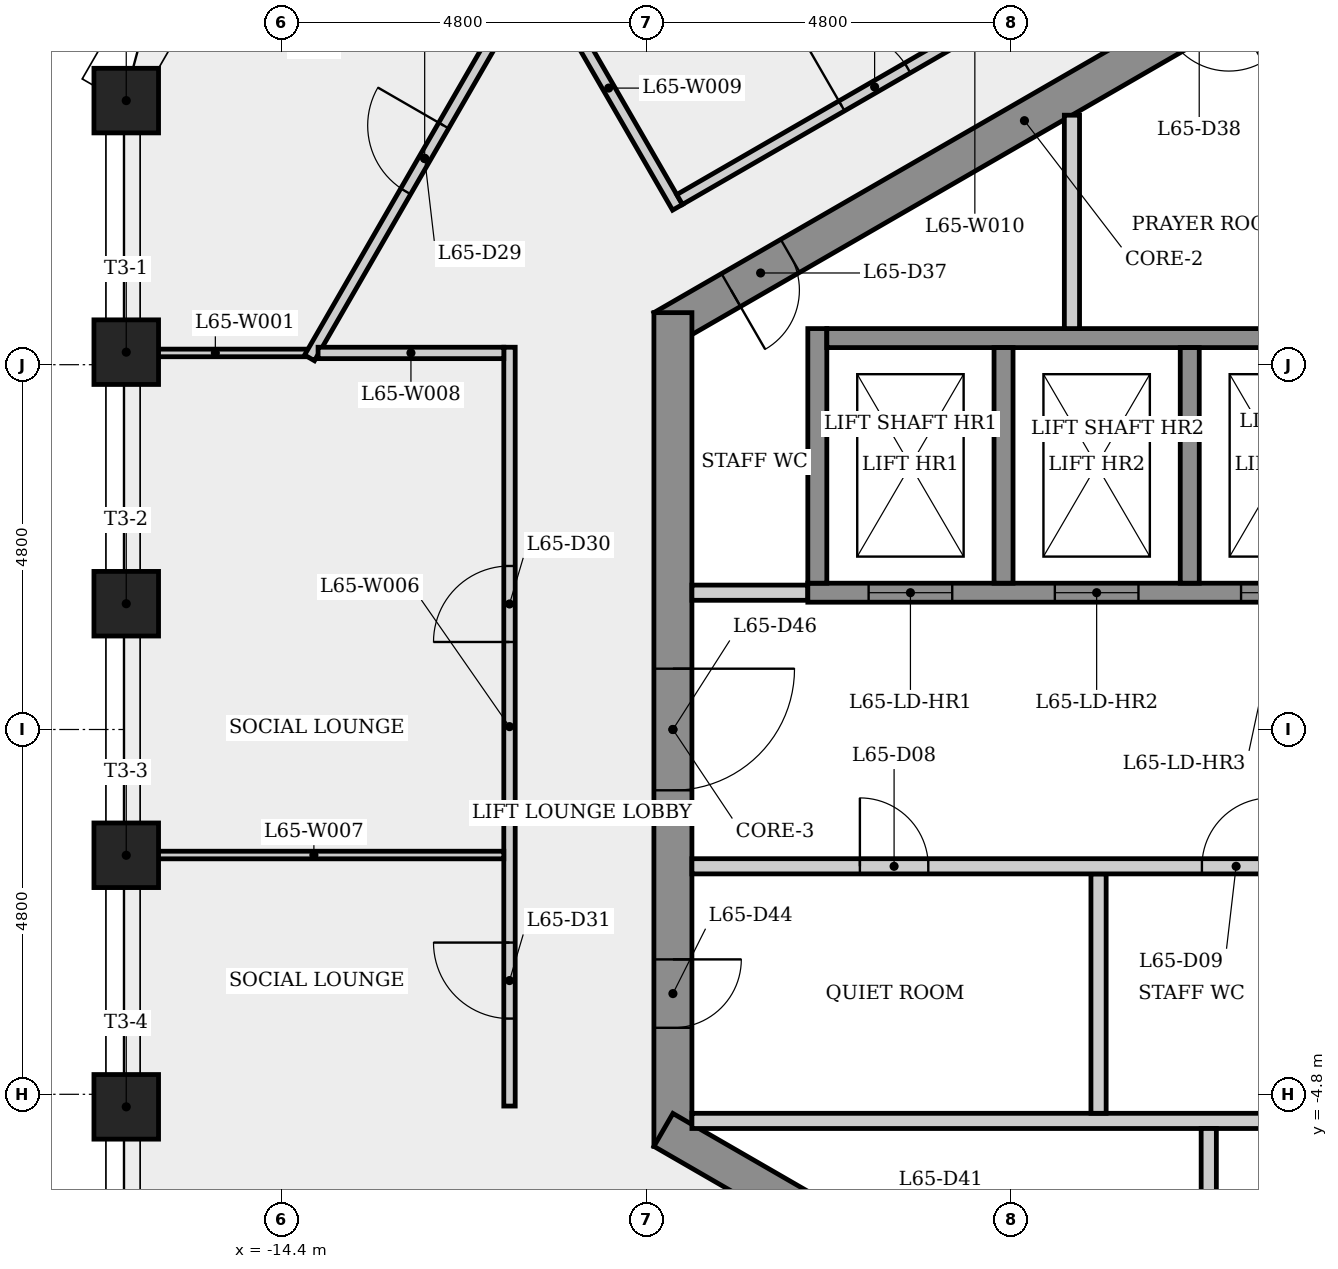
"""IFC4 building model, lengths in metres.
Left out: names, types, materials, properties, quantities, classifications, styles, units other than length and angle.
Written with IfcOpenShell. Run it as: python <this file> out.ifc"""

import sys

from ifc_helpers import new_model, si_unit, direction, frame, frame_2d, origin, origin_2d, place, context, subcontext, project, spatial, rectangle, extrude, element, fill, save


model = new_model("IFC4")
c1 = context("Model", 3, precision=1e-05, world=origin(), true_north=direction((0.0, 1.0)))
c2 = subcontext(c1, "Body", "Model", "MODEL_VIEW")
j1 = project(units=[si_unit("LENGTHUNIT", "METRE"), si_unit("PLANEANGLEUNIT", "RADIAN")], contexts=[c1])
p1 = place(None, origin())
s1 = spatial("IfcSite", under=j1, at=p1, CompositionType="ELEMENT")
p2 = place(p1, origin())
s2 = spatial("IfcBuilding", under=s1, at=p2, CompositionType="ELEMENT")
p3 = place(p2, frame((0.0, 0.0, 242.7)))
s3 = spatial("IfcBuildingStorey", under=s2, at=p3, CompositionType="ELEMENT", Elevation=242.7)
p4 = place(p3, frame((0.125, 10.753, 0.0), z_axis=(0.0, 0.0, 1.0), x_axis=(-0.866023993627, -0.500002442456, 0.0)))
e1 = element("IfcWall", 1, at=p4, inside=s3, PredefinedType="SHEAR", context=c2, shape_type="SweptSolid", body=[
    extrude(rectangle(XDim=10.97, YDim=0.5, at=frame_2d((5.485, 0.0))), origin(), (0.0, 0.0, 1.0), 3.4),
])
p5 = place(p4, frame((9.043, 0.0, 0.0)))
e2 = element("IfcOpeningElement", 2, at=p5, cuts=e1, PredefinedType="OPENING", context=c2, shape_type="SweptSolid", body=[
    extrude(rectangle(XDim=0.9, YDim=2.1, at=frame_2d((0.45, 1.05))), frame((0.0, 0.26, 0.0), z_axis=(0.0, -1.0, 0.0), x_axis=(1.0, 0.0, 0.0)), (0.0, 0.0, 1.0), 0.52),
])
p6 = place(p4, frame((2.38, 0.0, 0.0)))
e3 = element("IfcOpeningElement", 3, at=p6, cuts=e1, PredefinedType="OPENING", context=c2, shape_type="SweptSolid", body=[
    extrude(rectangle(XDim=0.9, YDim=2.1, at=frame_2d((0.45, 1.05))), frame((0.0, 0.26, 0.0), z_axis=(0.0, -1.0, 0.0), x_axis=(1.0, 0.0, 0.0)), (0.0, 0.0, 1.0), 0.52),
])
p7 = place(p3, frame((-9.25, 5.485, 0.0), z_axis=(0.0, 0.0, 1.0), x_axis=(0.0, -1.0, 0.0)))
e4 = element("IfcWall", 4, at=p7, inside=s3, PredefinedType="SHEAR", context=c2, shape_type="SweptSolid", body=[
    extrude(rectangle(XDim=10.97, YDim=0.5, at=frame_2d((5.485, 0.0))), origin(), (0.0, 0.0, 1.0), 3.4),
])
p8 = place(p7, frame((8.51, 0.0, 0.0)))
e5 = element("IfcOpeningElement", 5, at=p8, cuts=e4, PredefinedType="OPENING", context=c2, shape_type="SweptSolid", body=[
    extrude(rectangle(XDim=0.9, YDim=2.1, at=frame_2d((0.45, 1.05))), frame((0.0, 0.26, 0.0), z_axis=(0.0, -1.0, 0.0), x_axis=(1.0, 0.0, 0.0)), (0.0, 0.0, 1.0), 0.52),
])
p9 = place(p7, frame((4.685, 0.0, 0.0)))
e6 = element("IfcOpeningElement", 6, at=p9, cuts=e4, PredefinedType="OPENING", context=c2, shape_type="SweptSolid", body=[
    extrude(rectangle(XDim=1.6, YDim=2.1, at=frame_2d((0.8, 1.05))), frame((0.0, 0.26, 0.0), z_axis=(0.0, -1.0, 0.0), x_axis=(1.0, 0.0, 0.0)), (0.0, 0.0, 1.0), 0.52),
])
p10 = place(p3, frame((-9.375, -5.268, 0.0), z_axis=(0.0, 0.0, 1.0), x_axis=(0.866023993627, -0.500002442456, 0.0)))
e7 = element("IfcWall", 7, at=p10, inside=s3, PredefinedType="SHEAR", context=c2, shape_type="SweptSolid", body=[
    extrude(rectangle(XDim=10.97, YDim=0.5, at=frame_2d((5.485, 0.0))), origin(), (0.0, 0.0, 1.0), 3.4),
])
p11 = place(p10, frame((3.765, 0.0, 0.0)))
e8 = element("IfcOpeningElement", 8, at=p11, cuts=e7, PredefinedType="OPENING", context=c2, shape_type="SweptSolid", body=[
    extrude(rectangle(XDim=0.9, YDim=2.1, at=frame_2d((0.45, 1.05))), frame((0.0, 0.26, 0.0), z_axis=(0.0, -1.0, 0.0), x_axis=(1.0, 0.0, 0.0)), (0.0, 0.0, 1.0), 0.52),
])
p12 = place(p10, frame((8.96, 0.0, 0.0)))
e9 = element("IfcOpeningElement", 9, at=p12, cuts=e7, PredefinedType="OPENING", context=c2, shape_type="SweptSolid", body=[
    extrude(rectangle(XDim=0.9, YDim=2.1, at=frame_2d((0.45, 1.05))), frame((0.0, 0.26, 0.0), z_axis=(0.0, -1.0, 0.0), x_axis=(1.0, 0.0, 0.0)), (0.0, 0.0, 1.0), 0.52),
])
for number, where, z_axis, x_axis in (
    (10, (-16.442, 8.275, 0.0), (0.0, 0.0, 1.0), (-1.0, 0.0, 0.0)),
    (11, (-16.442, 4.965, 0.0), (0.0, 0.0, 1.0), (-1.0, 0.0, 0.0)),
    (12, (-16.442, 1.655, 0.0), (0.0, 0.0, 1.0), (-1.0, 0.0, 0.0)),
    (13, (-16.442, -1.655, 0.0), (0.0, 0.0, 1.0), (-1.0, 0.0, 0.0)),
    (14, (-16.442, -4.965, 0.0), (0.0, 0.0, 1.0), (-1.0, 0.0, 0.0)),
):
    element("IfcColumn", number, at=place(p3, frame(where, z_axis=z_axis, x_axis=x_axis)), inside=s3, PredefinedType="COLUMN", context=c2, shape_type="SweptSolid", body=[
        extrude(rectangle(XDim=0.85, YDim=0.85, at=origin_2d()), origin(), (0.0, 0.0, 1.0), 3.4),
    ])
p13 = place(p3, frame((-14.069, 4.955, 0.0), z_axis=(0.0, 0.0, 1.0), x_axis=(-1.0, 0.0, 0.0)))
e15 = element("IfcWall", 15, at=p13, inside=s3, PredefinedType="PARTITIONING", context=c2, shape_type="SweptSolid", body=[
    extrude(rectangle(XDim=2.404, YDim=0.1, at=frame_2d((1.202, 0.0))), origin(), (0.0, 0.0, 1.0), 3.05),
])
p14 = place(p3, frame((-14.031, 4.89, 0.0), z_axis=(0.0, 0.0, 1.0), x_axis=(0.499973530083, 0.866040685659, 0.0)))
e16 = element("IfcWall", 16, at=p14, inside=s3, PredefinedType="PARTITIONING", context=c2, shape_type="SweptSolid", body=[
    extrude(rectangle(XDim=6.06, YDim=0.15, at=frame_2d((3.03, 0.0))), origin(), (0.0, 0.0, 1.0), 3.05),
])
p15 = place(p14, frame((2.53, 0.0, 0.0)))
e17 = element("IfcOpeningElement", 17, at=p15, cuts=e16, PredefinedType="OPENING", context=c2, shape_type="SweptSolid", body=[
    extrude(rectangle(XDim=1.0, YDim=2.1, at=frame_2d((0.5, 1.05))), frame((0.0, 0.085, 0.0), z_axis=(0.0, -1.0, 0.0), x_axis=(1.0, 0.0, 0.0)), (0.0, 0.0, 1.0), 0.17),
])
p16 = place(p3, frame((-11.4, -4.955, 0.0), z_axis=(0.0, 0.0, 1.0), x_axis=(0.0, 1.0, 0.0)))
e18 = element("IfcWall", 18, at=p16, inside=s3, PredefinedType="PARTITIONING", context=c2, shape_type="SweptSolid", body=[
    extrude(rectangle(XDim=9.984, YDim=0.15, at=frame_2d((4.992, 0.0))), origin(), (0.0, 0.0, 1.0), 3.05),
])
p17 = place(p16, frame((6.106, 0.0, 0.0)))
e19 = element("IfcOpeningElement", 19, at=p17, cuts=e18, PredefinedType="OPENING", context=c2, shape_type="SweptSolid", body=[
    extrude(rectangle(XDim=1.0, YDim=2.1, at=frame_2d((0.5, 1.05))), frame((0.0, 0.085, 0.0), z_axis=(0.0, -1.0, 0.0), x_axis=(1.0, 0.0, 0.0)), (0.0, 0.0, 1.0), 0.17),
])
p18 = place(p16, frame((1.151, 0.0, 0.0)))
e20 = element("IfcOpeningElement", 20, at=p18, cuts=e18, PredefinedType="OPENING", context=c2, shape_type="SweptSolid", body=[
    extrude(rectangle(XDim=1.0, YDim=2.1, at=frame_2d((0.5, 1.05))), frame((0.0, 0.085, 0.0), z_axis=(0.0, -1.0, 0.0), x_axis=(1.0, 0.0, 0.0)), (0.0, 0.0, 1.0), 0.17),
])
p19 = place(p3, frame((-11.475, -1.652, 0.0), z_axis=(0.0, 0.0, 1.0), x_axis=(-1.0, 0.0, 0.0)))
e21 = element("IfcWall", 21, at=p19, inside=s3, PredefinedType="PARTITIONING", context=c2, shape_type="SweptSolid", body=[
    extrude(rectangle(XDim=4.997, YDim=0.1, at=frame_2d((2.499, 0.0))), origin(), (0.0, 0.0, 1.0), 3.05),
])
p20 = place(p3, frame((-11.475, 4.955, 0.0), z_axis=(0.0, 0.0, 1.0), x_axis=(-1.0, 0.0, 0.0)))
e22 = element("IfcWall", 22, at=p20, inside=s3, PredefinedType="PARTITIONING", context=c2, shape_type="SweptSolid", body=[
    extrude(rectangle(XDim=2.444, YDim=0.15, at=frame_2d((1.222, 0.0))), origin(), (0.0, 0.0, 1.0), 3.05),
])
p21 = place(p3, frame((-11.001, 10.008, 0.0), z_axis=(0.0, 0.0, 1.0), x_axis=(0.500053022251, -0.865994789209, 0.0)))
e23 = element("IfcWall", 23, at=p21, inside=s3, PredefinedType="PARTITIONING", context=c2, shape_type="SweptSolid", body=[
    extrude(rectangle(XDim=3.623, YDim=0.15, at=frame_2d((1.811, 0.0))), origin(), (0.0, 0.0, 1.0), 3.05),
])
p22 = place(p3, frame((-9.162, 6.973, 0.0), z_axis=(0.0, 0.0, 1.0), x_axis=(0.866025611375, 0.499999640442, 0.0)))
e24 = element("IfcWall", 24, at=p22, inside=s3, PredefinedType="PARTITIONING", context=c2, shape_type="SweptSolid", body=[
    extrude(rectangle(XDim=8.971, YDim=0.15, at=frame_2d((4.486, 0.0))), origin(), (0.0, 0.0, 1.0), 3.05),
])
p23 = place(p22, frame((6.213, 0.0, 0.0)))
e25 = element("IfcOpeningElement", 25, at=p23, cuts=e24, PredefinedType="OPENING", context=c2, shape_type="SweptSolid", body=[
    extrude(rectangle(XDim=0.9, YDim=2.1, at=frame_2d((0.45, 1.05))), frame((0.0, 0.085, 0.0), z_axis=(0.0, -1.0, 0.0), x_axis=(1.0, 0.0, 0.0)), (0.0, 0.0, 1.0), 0.17),
])
p24 = place(p22, frame((2.463, 0.0, 0.0)))
e26 = element("IfcOpeningElement", 26, at=p24, cuts=e24, PredefinedType="OPENING", context=c2, shape_type="SweptSolid", body=[
    extrude(rectangle(XDim=1.0, YDim=2.1, at=frame_2d((0.5, 1.05))), frame((0.0, 0.085, 0.0), z_axis=(0.0, -1.0, 0.0), x_axis=(1.0, 0.0, 0.0)), (0.0, 0.0, 1.0), 0.17),
])
p25 = place(p3, frame((-9.0, 1.8, 0.0), z_axis=(0.0, 0.0, 1.0), x_axis=(1.0, 0.0, 0.0)))
e27 = element("IfcWall", 27, at=p25, inside=s3, PredefinedType="PARTITIONING", context=c2, shape_type="SweptSolid", body=[
    extrude(rectangle(XDim=1.525, YDim=0.2, at=frame_2d((0.763, 0.0))), origin(), (0.0, 0.0, 1.0), 3.05),
])
p26 = place(p3, frame((-9.0, -5.15, 0.0), z_axis=(0.0, 0.0, 1.0), x_axis=(1.0, 0.0, 0.0)))
e28 = element("IfcWall", 28, at=p26, inside=s3, PredefinedType="PARTITIONING", context=c2, shape_type="SweptSolid", body=[
    extrude(rectangle(XDim=11.325, YDim=0.2, at=frame_2d((5.663, 0.0))), origin(), (0.0, 0.0, 1.0), 3.05),
])
p27 = place(p3, frame((-7.475, 1.8, 0.0), z_axis=(0.0, 0.0, 1.0), x_axis=(1.0, 0.0, 0.0)))
e29 = element("IfcWall", 29, at=p27, inside=s3, PredefinedType="SHEAR", context=c2, shape_type="SweptSolid", body=[
    extrude(rectangle(XDim=14.95, YDim=0.25, at=frame_2d((7.475, 0.0))), origin(), (0.0, 0.0, 1.0), 3.05),
])
p28 = place(p27, frame((0.8, 0.0, 0.0)))
e30 = element("IfcOpeningElement", 30, at=p28, cuts=e29, PredefinedType="OPENING", context=c2, shape_type="SweptSolid", body=[
    extrude(rectangle(XDim=1.1, YDim=2.1, at=frame_2d((0.55, 1.05))), frame((0.0, 0.135, 0.0), z_axis=(0.0, -1.0, 0.0), x_axis=(1.0, 0.0, 0.0)), (0.0, 0.0, 1.0), 0.27),
])
p29 = place(p27, frame((3.25, 0.0, 0.0)))
e31 = element("IfcOpeningElement", 31, at=p29, cuts=e29, PredefinedType="OPENING", context=c2, shape_type="SweptSolid", body=[
    extrude(rectangle(XDim=1.1, YDim=2.1, at=frame_2d((0.55, 1.05))), frame((0.0, 0.135, 0.0), z_axis=(0.0, -1.0, 0.0), x_axis=(1.0, 0.0, 0.0)), (0.0, 0.0, 1.0), 0.27),
])
p30 = place(p27, frame((5.7, 0.0, 0.0)))
e32 = element("IfcOpeningElement", 32, at=p30, cuts=e29, PredefinedType="OPENING", context=c2, shape_type="SweptSolid", body=[
    extrude(rectangle(XDim=1.1, YDim=2.1, at=frame_2d((0.55, 1.05))), frame((0.0, 0.135, 0.0), z_axis=(0.0, -1.0, 0.0), x_axis=(1.0, 0.0, 0.0)), (0.0, 0.0, 1.0), 0.27),
])
p31 = place(p27, frame((8.15, 0.0, 0.0)))
e33 = element("IfcOpeningElement", 33, at=p31, cuts=e29, PredefinedType="OPENING", context=c2, shape_type="SweptSolid", body=[
    extrude(rectangle(XDim=1.1, YDim=2.1, at=frame_2d((0.55, 1.05))), frame((0.0, 0.135, 0.0), z_axis=(0.0, -1.0, 0.0), x_axis=(1.0, 0.0, 0.0)), (0.0, 0.0, 1.0), 0.27),
])
p32 = place(p27, frame((10.6, 0.0, 0.0)))
e34 = element("IfcOpeningElement", 34, at=p32, cuts=e29, PredefinedType="OPENING", context=c2, shape_type="SweptSolid", body=[
    extrude(rectangle(XDim=1.1, YDim=2.1, at=frame_2d((0.55, 1.05))), frame((0.0, 0.135, 0.0), z_axis=(0.0, -1.0, 0.0), x_axis=(1.0, 0.0, 0.0)), (0.0, 0.0, 1.0), 0.27),
])
p33 = place(p27, frame((13.05, 0.0, 0.0)))
e35 = element("IfcOpeningElement", 35, at=p33, cuts=e29, PredefinedType="OPENING", context=c2, shape_type="SweptSolid", body=[
    extrude(rectangle(XDim=1.1, YDim=2.1, at=frame_2d((0.55, 1.05))), frame((0.0, 0.135, 0.0), z_axis=(0.0, -1.0, 0.0), x_axis=(1.0, 0.0, 0.0)), (0.0, 0.0, 1.0), 0.27),
])
p34 = place(p3, frame((-7.35, 1.925, 0.0), z_axis=(0.0, 0.0, 1.0), x_axis=(0.0, 1.0, 0.0)))
e36 = element("IfcWall", 36, at=p34, inside=s3, PredefinedType="SHEAR", context=c2, shape_type="SweptSolid", body=[
    extrude(rectangle(XDim=3.35, YDim=0.25, at=frame_2d((1.675, 0.0))), origin(), (0.0, 0.0, 1.0), 3.05),
])
p35 = place(p3, frame((-7.225, 5.15, 0.0), z_axis=(0.0, 0.0, 1.0), x_axis=(1.0, 0.0, 0.0)))
e37 = element("IfcWall", 37, at=p35, inside=s3, PredefinedType="SHEAR", context=c2, shape_type="SweptSolid", body=[
    extrude(rectangle(XDim=14.7, YDim=0.25, at=frame_2d((7.35, 0.0))), origin(), (0.0, 0.0, 1.0), 3.05),
])
p36 = place(p3, frame((-4.9, 5.025, 0.0), z_axis=(0.0, 0.0, 1.0), x_axis=(0.0, -1.0, 0.0)))
e38 = element("IfcWall", 38, at=p36, inside=s3, PredefinedType="SHEAR", context=c2, shape_type="SweptSolid", body=[
    extrude(rectangle(XDim=3.1, YDim=0.25, at=frame_2d((1.55, 0.0))), origin(), (0.0, 0.0, 1.0), 3.4),
])
p37 = place(p3, frame((-4.0, 8.083, 0.0), z_axis=(0.0, 0.0, 1.0), x_axis=(0.0, -1.0, 0.0)))
e39 = element("IfcWall", 39, at=p37, inside=s3, PredefinedType="PARTITIONING", context=c2, shape_type="SweptSolid", body=[
    extrude(rectangle(XDim=2.808, YDim=0.2, at=frame_2d((1.404, 0.0))), origin(), (0.0, 0.0, 1.0), 3.05),
])
p38 = place(p3, frame((-3.65, -1.9, 0.0), z_axis=(0.0, 0.0, 1.0), x_axis=(0.0, -1.0, 0.0)))
e40 = element("IfcWall", 40, at=p38, inside=s3, PredefinedType="PARTITIONING", context=c2, shape_type="SweptSolid", body=[
    extrude(rectangle(XDim=3.15, YDim=0.2, at=frame_2d((1.575, 0.0))), origin(), (0.0, 0.0, 1.0), 3.05),
])
p39 = place(p3, frame((-9.0, -1.8, 0.0), z_axis=(0.0, 0.0, 1.0), x_axis=(1.0, 0.0, 0.0)))
e41 = element("IfcWall", 41, at=p39, inside=s3, PredefinedType="PARTITIONING", context=c2, shape_type="SweptSolid", body=[
    extrude(rectangle(XDim=11.325, YDim=0.2, at=frame_2d((5.663, 0.0))), origin(), (0.0, 0.0, 1.0), 3.05),
])
p40 = place(p39, frame((2.21, 0.0, 0.0)))
e42 = element("IfcOpeningElement", 42, at=p40, cuts=e41, PredefinedType="OPENING", context=c2, shape_type="SweptSolid", body=[
    extrude(rectangle(XDim=0.9, YDim=2.1, at=frame_2d((0.45, 1.05))), frame((0.0, 0.11, 0.0), z_axis=(0.0, -1.0, 0.0), x_axis=(1.0, 0.0, 0.0)), (0.0, 0.0, 1.0), 0.22),
])
p41 = place(p39, frame((6.71, 0.0, 0.0)))
e43 = element("IfcOpeningElement", 43, at=p41, cuts=e41, PredefinedType="OPENING", context=c2, shape_type="SweptSolid", body=[
    extrude(rectangle(XDim=0.9, YDim=2.1, at=frame_2d((0.45, 1.05))), frame((0.0, 0.11, 0.0), z_axis=(0.0, -1.0, 0.0), x_axis=(1.0, 0.0, 0.0)), (0.0, 0.0, 1.0), 0.22),
])
p42 = place(p39, frame((9.713, 0.0, 0.0)))
e44 = element("IfcOpeningElement", 44, at=p42, cuts=e41, PredefinedType="OPENING", context=c2, shape_type="SweptSolid", body=[
    extrude(rectangle(XDim=0.9, YDim=2.1, at=frame_2d((0.45, 1.05))), frame((0.0, 0.11, 0.0), z_axis=(0.0, -1.0, 0.0), x_axis=(1.0, 0.0, 0.0)), (0.0, 0.0, 1.0), 0.22),
])
p43 = place(p3, frame((-2.45, 5.025, 0.0), z_axis=(0.0, 0.0, 1.0), x_axis=(0.0, -1.0, 0.0)))
e45 = element("IfcWall", 45, at=p43, inside=s3, PredefinedType="SHEAR", context=c2, shape_type="SweptSolid", body=[
    extrude(rectangle(XDim=3.1, YDim=0.25, at=frame_2d((1.55, 0.0))), origin(), (0.0, 0.0, 1.0), 3.4),
])
p44 = place(p3, frame((-2.2, -5.25, 0.0), z_axis=(0.0, 0.0, 1.0), x_axis=(0.0, -1.0, 0.0)))
e46 = element("IfcWall", 46, at=p44, inside=s3, PredefinedType="PARTITIONING", context=c2, shape_type="SweptSolid", body=[
    extrude(rectangle(XDim=3.872, YDim=0.2, at=frame_2d((1.936, 0.0))), origin(), (0.0, 0.0, 1.0), 3.05),
])
p45 = place(p28, origin())
e47 = element("IfcDoor", 47, at=p45, inside=s3, OperationType="SLIDING_TO_LEFT", PredefinedType="DOOR", context=c2, shape_type="SweptSolid", body=[
    extrude(rectangle(XDim=1.1, YDim=2.1, at=frame_2d((0.55, 1.05))), frame((0.0, 0.025, 0.0), z_axis=(0.0, -1.0, 0.0), x_axis=(1.0, 0.0, 0.0)), (0.0, 0.0, 1.0), 0.05),
])
fill(e30, e47)
p46 = place(p29, origin())
e48 = element("IfcDoor", 48, at=p46, inside=s3, OperationType="SLIDING_TO_LEFT", PredefinedType="DOOR", context=c2, shape_type="SweptSolid", body=[
    extrude(rectangle(XDim=1.1, YDim=2.1, at=frame_2d((0.55, 1.05))), frame((0.0, 0.025, 0.0), z_axis=(0.0, -1.0, 0.0), x_axis=(1.0, 0.0, 0.0)), (0.0, 0.0, 1.0), 0.05),
])
fill(e31, e48)
p47 = place(p30, origin())
e49 = element("IfcDoor", 49, at=p47, inside=s3, OperationType="SLIDING_TO_LEFT", PredefinedType="DOOR", context=c2, shape_type="SweptSolid", body=[
    extrude(rectangle(XDim=1.1, YDim=2.1, at=frame_2d((0.55, 1.05))), frame((0.0, 0.025, 0.0), z_axis=(0.0, -1.0, 0.0), x_axis=(1.0, 0.0, 0.0)), (0.0, 0.0, 1.0), 0.05),
])
fill(e32, e49)
p48 = place(p40, origin())
e50 = element("IfcDoor", 50, at=p48, inside=s3, OperationType="SINGLE_SWING_LEFT", PredefinedType="DOOR", context=c2, shape_type="SweptSolid", body=[
    extrude(rectangle(XDim=0.9, YDim=2.1, at=frame_2d((0.45, 1.05))), frame((0.0, 0.025, 0.0), z_axis=(0.0, -1.0, 0.0), x_axis=(1.0, 0.0, 0.0)), (0.0, 0.0, 1.0), 0.05),
])
fill(e42, e50)
p49 = place(p41, origin())
e51 = element("IfcDoor", 51, at=p49, inside=s3, OperationType="SINGLE_SWING_RIGHT", PredefinedType="DOOR", context=c2, shape_type="SweptSolid", body=[
    extrude(rectangle(XDim=0.9, YDim=2.1, at=frame_2d((0.45, 1.05))), frame((0.0, 0.025, 0.0), z_axis=(0.0, -1.0, 0.0), x_axis=(1.0, 0.0, 0.0)), (0.0, 0.0, 1.0), 0.05),
])
fill(e43, e51)
p50 = place(p15, origin())
e52 = element("IfcDoor", 52, at=p50, inside=s3, OperationType="SINGLE_SWING_RIGHT", PredefinedType="DOOR", context=c2, shape_type="SweptSolid", body=[
    extrude(rectangle(XDim=1.0, YDim=2.1, at=frame_2d((0.5, 1.05))), frame((0.0, 0.025, 0.0), z_axis=(0.0, -1.0, 0.0), x_axis=(1.0, 0.0, 0.0)), (0.0, 0.0, 1.0), 0.05),
])
fill(e17, e52)
p51 = place(p17, origin())
e53 = element("IfcDoor", 53, at=p51, inside=s3, OperationType="SINGLE_SWING_LEFT", PredefinedType="DOOR", context=c2, shape_type="SweptSolid", body=[
    extrude(rectangle(XDim=1.0, YDim=2.1, at=frame_2d((0.5, 1.05))), frame((0.0, 0.025, 0.0), z_axis=(0.0, -1.0, 0.0), x_axis=(1.0, 0.0, 0.0)), (0.0, 0.0, 1.0), 0.05),
])
fill(e19, e53)
p52 = place(p18, origin())
e54 = element("IfcDoor", 54, at=p52, inside=s3, OperationType="SINGLE_SWING_RIGHT", PredefinedType="DOOR", context=c2, shape_type="SweptSolid", body=[
    extrude(rectangle(XDim=1.0, YDim=2.1, at=frame_2d((0.5, 1.05))), frame((0.0, 0.025, 0.0), z_axis=(0.0, -1.0, 0.0), x_axis=(1.0, 0.0, 0.0)), (0.0, 0.0, 1.0), 0.05),
])
fill(e20, e54)
p53 = place(p24, origin())
e55 = element("IfcDoor", 55, at=p53, inside=s3, OperationType="SINGLE_SWING_LEFT", PredefinedType="DOOR", context=c2, shape_type="SweptSolid", body=[
    extrude(rectangle(XDim=1.0, YDim=2.1, at=frame_2d((0.5, 1.05))), frame((0.0, 0.025, 0.0), z_axis=(0.0, -1.0, 0.0), x_axis=(1.0, 0.0, 0.0)), (0.0, 0.0, 1.0), 0.05),
])
fill(e26, e55)
p54 = place(p5, origin())
e56 = element("IfcDoor", 56, at=p54, inside=s3, OperationType="SINGLE_SWING_RIGHT", PredefinedType="DOOR", context=c2, shape_type="SweptSolid", body=[
    extrude(rectangle(XDim=0.9, YDim=2.1, at=frame_2d((0.45, 1.05))), frame((0.0, 0.025, 0.0), z_axis=(0.0, -1.0, 0.0), x_axis=(1.0, 0.0, 0.0)), (0.0, 0.0, 1.0), 0.05),
])
fill(e2, e56)
p55 = place(p8, origin())
e57 = element("IfcDoor", 57, at=p55, inside=s3, OperationType="SINGLE_SWING_LEFT", PredefinedType="DOOR", context=c2, shape_type="SweptSolid", body=[
    extrude(rectangle(XDim=0.9, YDim=2.1, at=frame_2d((0.45, 1.05))), frame((0.0, 0.025, 0.0), z_axis=(0.0, -1.0, 0.0), x_axis=(1.0, 0.0, 0.0)), (0.0, 0.0, 1.0), 0.05),
])
fill(e5, e57)
p56 = place(p9, origin())
e58 = element("IfcDoor", 58, at=p56, inside=s3, OperationType="SINGLE_SWING_LEFT", PredefinedType="DOOR", context=c2, shape_type="SweptSolid", body=[
    extrude(rectangle(XDim=1.6, YDim=2.1, at=frame_2d((0.8, 1.05))), frame((0.0, 0.025, 0.0), z_axis=(0.0, -1.0, 0.0), x_axis=(1.0, 0.0, 0.0)), (0.0, 0.0, 1.0), 0.05),
])
fill(e6, e58)
save(model, sys.argv[1])
